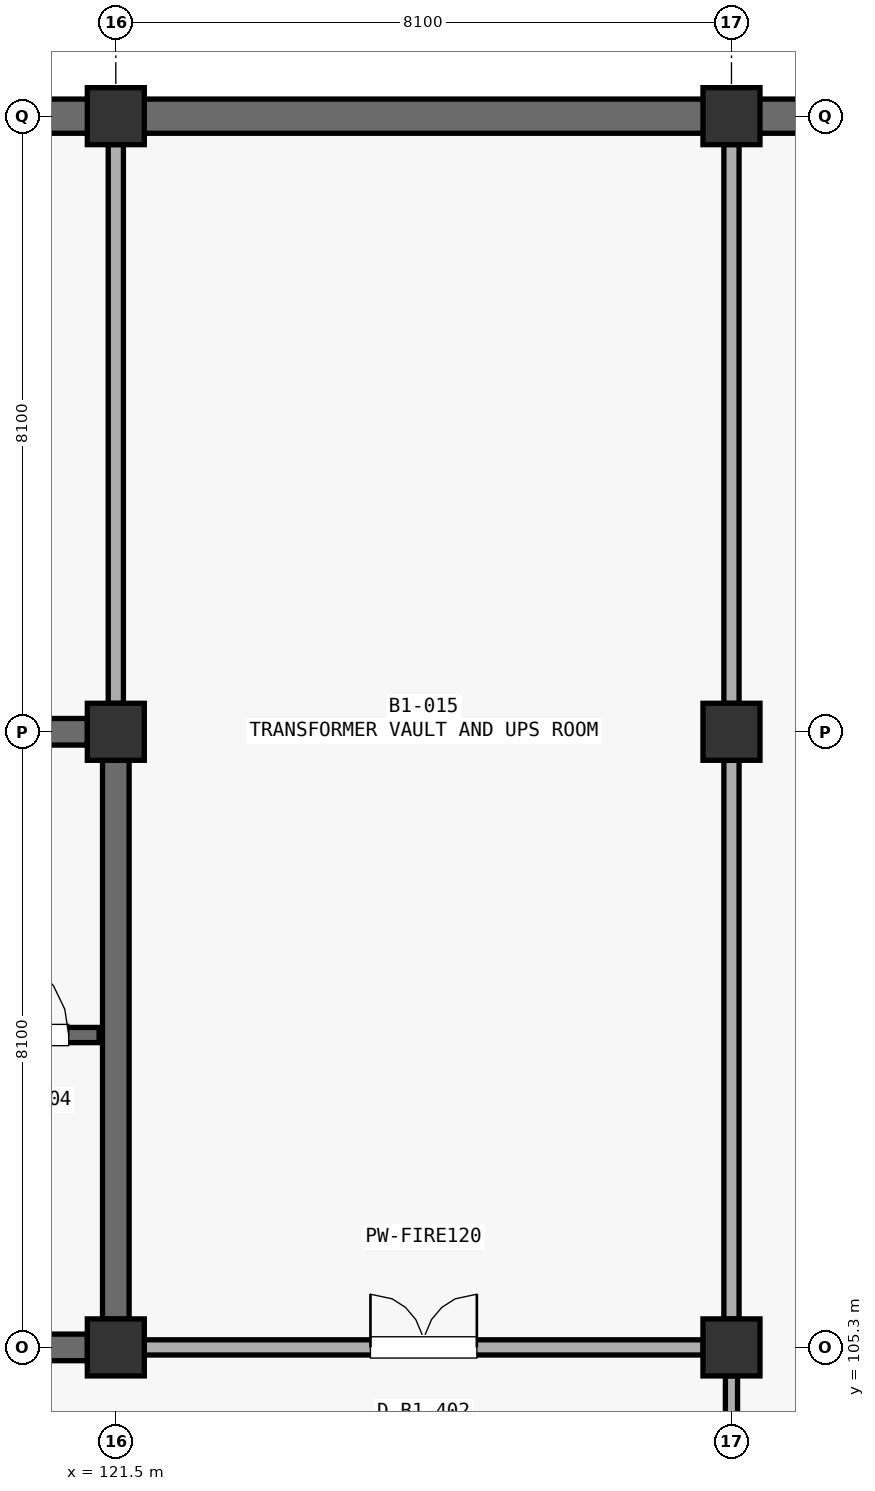
"""IFC4 building model, lengths in metres.
Left out: names, types, materials, properties, quantities, classifications, styles, units other than length and angle.
Written with IfcOpenShell. Run it as: python <this file> out.ifc"""

import sys

from ifc_helpers import new_model, si_unit, direction, frame, frame_2d, origin, origin_2d, place, context, subcontext, project, spatial, rectangle, extrude, element, fill, save


model = new_model("IFC4")
c1 = context("Model", 3, precision=1e-05, world=origin(), true_north=direction((0.0, 1.0)))
c2 = subcontext(c1, "Body", "Model", "MODEL_VIEW")
j1 = project(units=[si_unit("LENGTHUNIT", "METRE"), si_unit("PLANEANGLEUNIT", "RADIAN")], contexts=[c1])
p1 = place(None, origin())
s1 = spatial("IfcSite", under=j1, at=p1, CompositionType="ELEMENT")
p2 = place(p1, origin())
s2 = spatial("IfcBuilding", under=s1, at=p2, CompositionType="ELEMENT")
p3 = place(p2, frame((0.0, 0.0, -5.1)))
s3 = spatial("IfcBuildingStorey", under=s2, at=p3, CompositionType="ELEMENT", Elevation=-5.1)
for number, where, z_axis, x_axis in (
    (1, (121.5, 105.3, 0.0), (0.0, 0.0, 1.0), (1.0, 0.0, 0.0)),
    (2, (121.5, 113.4, 0.0), (0.0, 0.0, 1.0), (1.0, 0.0, 0.0)),
    (3, (121.5, 121.5, 0.0), (0.0, 0.0, 1.0), (1.0, 0.0, 0.0)),
    (4, (129.6, 105.3, 0.0), (0.0, 0.0, 1.0), (1.0, 0.0, 0.0)),
    (5, (129.6, 113.4, 0.0), (0.0, 0.0, 1.0), (1.0, 0.0, 0.0)),
    (6, (129.6, 121.5, 0.0), (0.0, 0.0, 1.0), (1.0, 0.0, 0.0)),
):
    element("IfcColumn", number, at=place(p3, frame(where, z_axis=z_axis, x_axis=x_axis)), inside=s3, PredefinedType="COLUMN", context=c2, shape_type="SweptSolid", body=[
        extrude(rectangle(XDim=0.75, YDim=0.75, at=origin_2d()), origin(), (0.0, 0.0, 1.0), 5.1),
    ])
p4 = place(p3, frame((113.76, 121.5, 0.0), z_axis=(0.0, 0.0, 1.0), x_axis=(1.0, 0.0, 0.0)))
e7 = element("IfcWall", 7, at=p4, inside=s3, PredefinedType="SOLIDWALL", context=c2, shape_type="SweptSolid", body=[
    extrude(rectangle(XDim=7.38, YDim=0.45, at=frame_2d((3.69, 0.0))), origin(), (0.0, 0.0, 1.0), 3.83),
])
p5 = place(p3, frame((121.86, 121.5, 0.0), z_axis=(0.0, 0.0, 1.0), x_axis=(1.0, 0.0, 0.0)))
e8 = element("IfcWall", 8, at=p5, inside=s3, PredefinedType="SOLIDWALL", context=c2, shape_type="SweptSolid", body=[
    extrude(rectangle(XDim=7.38, YDim=0.45, at=frame_2d((3.69, 0.0))), origin(), (0.0, 0.0, 1.0), 4.13),
])
p6 = place(p3, frame((129.96, 121.5, 0.0), z_axis=(0.0, 0.0, 1.0), x_axis=(1.0, 0.0, 0.0)))
e9 = element("IfcWall", 9, at=p6, inside=s3, PredefinedType="SOLIDWALL", context=c2, shape_type="SweptSolid", body=[
    extrude(rectangle(XDim=7.33, YDim=0.45, at=frame_2d((3.665, 0.0))), origin(), (0.0, 0.0, 1.0), 4.13),
])
for number, where, z_axis, x_axis in (
    (10, (113.773, 113.4, 0.0), (0.0, 0.0, 1.0), (1.0, 0.0, 0.0)),
    (11, (121.5, 105.673, 0.0), (0.0, 0.0, 1.0), (0.0, 1.0, 0.0)),
):
    element("IfcWall", number, at=place(p3, frame(where, z_axis=z_axis, x_axis=x_axis)), inside=s3, PredefinedType="SHEAR", context=c2, shape_type="SweptSolid", body=[
        extrude(rectangle(XDim=7.354, YDim=0.35, at=frame_2d((3.677, 0.0))), origin(), (0.0, 0.0, 1.0), 4.782),
    ])
p7 = place(p3, frame((113.773, 105.3, 0.0), z_axis=(0.0, 0.0, 1.0), x_axis=(1.0, 0.0, 0.0)))
e12 = element("IfcWall", 12, at=p7, inside=s3, PredefinedType="SHEAR", context=c2, shape_type="SweptSolid", body=[
    extrude(rectangle(XDim=7.354, YDim=0.35, at=frame_2d((3.677, 0.0))), origin(), (0.0, 0.0, 1.0), 4.782),
])
p8 = place(p7, frame((5.104, 0.0, 0.0)))
e13 = element("IfcOpeningElement", 13, at=p8, cuts=e12, PredefinedType="OPENING", context=c2, shape_type="SweptSolid", body=[
    extrude(rectangle(XDim=1.2, YDim=2.2, at=frame_2d((0.6, 1.1))), frame((0.0, 0.185, 0.0), z_axis=(0.0, -1.0, 0.0), x_axis=(1.0, 0.0, 0.0)), (0.0, 0.0, 1.0), 0.37),
])
p9 = place(p3, frame((113.62, 109.41, 0.0), z_axis=(0.0, 0.0, 1.0), x_axis=(1.0, 0.0, 0.0)))
e14 = element("IfcWall", 14, at=p9, inside=s3, PredefinedType="SHEAR", context=c2, shape_type="SweptSolid", body=[
    extrude(rectangle(XDim=7.66, YDim=0.2, at=frame_2d((3.83, 0.0))), origin(), (0.0, 0.0, 1.0), 4.782),
])
p10 = place(p9, frame((6.11, 0.0, 0.0)))
e15 = element("IfcOpeningElement", 15, at=p10, cuts=e14, PredefinedType="OPENING", context=c2, shape_type="SweptSolid", body=[
    extrude(rectangle(XDim=1.15, YDim=2.2, at=frame_2d((0.575, 1.1))), frame((0.0, 0.11, 0.0), z_axis=(0.0, -1.0, 0.0), x_axis=(1.0, 0.0, 0.0)), (0.0, 0.0, 1.0), 0.22),
])
p11 = place(p3, frame((121.873, 105.3, 0.0), z_axis=(0.0, 0.0, 1.0), x_axis=(1.0, 0.0, 0.0)))
e16 = element("IfcWall", 16, at=p11, inside=s3, PredefinedType="PARTITIONING", context=c2, shape_type="SweptSolid", body=[
    extrude(rectangle(XDim=7.354, YDim=0.2, at=frame_2d((3.677, 0.0))), origin(), (0.0, 0.0, 1.0), 3.932),
])
p12 = place(p11, frame((2.977, 0.0, 0.0)))
e17 = element("IfcOpeningElement", 17, at=p12, cuts=e16, PredefinedType="OPENING", context=c2, shape_type="SweptSolid", body=[
    extrude(rectangle(XDim=1.4, YDim=2.2, at=frame_2d((0.7, 1.1))), frame((0.0, 0.11, 0.0), z_axis=(0.0, -1.0, 0.0), x_axis=(1.0, 0.0, 0.0)), (0.0, 0.0, 1.0), 0.22),
])
p13 = place(p3, frame((129.6, 105.673, 0.0), z_axis=(0.0, 0.0, 1.0), x_axis=(0.0, 1.0, 0.0)))
e18 = element("IfcWall", 18, at=p13, inside=s3, PredefinedType="PARTITIONING", context=c2, shape_type="SweptSolid", body=[
    extrude(rectangle(XDim=7.354, YDim=0.2, at=frame_2d((3.677, 0.0))), origin(), (0.0, 0.0, 1.0), 4.032),
])
p14 = place(p3, frame((129.6, 113.773, 0.0), z_axis=(0.0, 0.0, 1.0), x_axis=(0.0, 1.0, 0.0)))
e19 = element("IfcWall", 19, at=p14, inside=s3, PredefinedType="PARTITIONING", context=c2, shape_type="SweptSolid", body=[
    extrude(rectangle(XDim=7.354, YDim=0.2, at=frame_2d((3.677, 0.0))), origin(), (0.0, 0.0, 1.0), 4.132),
])
p15 = place(p3, frame((121.5, 113.773, 0.0), z_axis=(0.0, 0.0, 1.0), x_axis=(0.0, 1.0, 0.0)))
e20 = element("IfcWall", 20, at=p15, inside=s3, PredefinedType="PARTITIONING", context=c2, shape_type="SweptSolid", body=[
    extrude(rectangle(XDim=7.354, YDim=0.2, at=frame_2d((3.677, 0.0))), origin(), (0.0, 0.0, 1.0), 3.832),
])
p16 = place(p3, frame((129.6, 97.573, 0.0), z_axis=(0.0, 0.0, 1.0), x_axis=(0.0, 1.0, 0.0)))
e21 = element("IfcWall", 21, at=p16, inside=s3, PredefinedType="PARTITIONING", context=c2, shape_type="SweptSolid", body=[
    extrude(rectangle(XDim=7.354, YDim=0.16, at=frame_2d((3.677, 0.0))), origin(), (0.0, 0.0, 1.0), 3.832),
])
p17 = place(p10, origin())
e22 = element("IfcDoor", 22, at=p17, inside=s3, OperationType="SINGLE_SWING_LEFT", PredefinedType="DOOR", context=c2, shape_type="SweptSolid", body=[
    extrude(rectangle(XDim=1.15, YDim=2.2, at=frame_2d((0.575, 1.1))), frame((0.0, 0.025, 0.0), z_axis=(0.0, -1.0, 0.0), x_axis=(1.0, 0.0, 0.0)), (0.0, 0.0, 1.0), 0.05),
])
fill(e15, e22)
p18 = place(p12, origin())
e23 = element("IfcDoor", 23, at=p18, inside=s3, OperationType="DOUBLE_SWING_LEFT", PredefinedType="DOOR", context=c2, shape_type="SweptSolid", body=[
    extrude(rectangle(XDim=1.4, YDim=2.2, at=frame_2d((0.7, 1.1))), frame((0.0, 0.025, 0.0), z_axis=(0.0, -1.0, 0.0), x_axis=(1.0, 0.0, 0.0)), (0.0, 0.0, 1.0), 0.05),
])
fill(e17, e23)
save(model, sys.argv[1])
